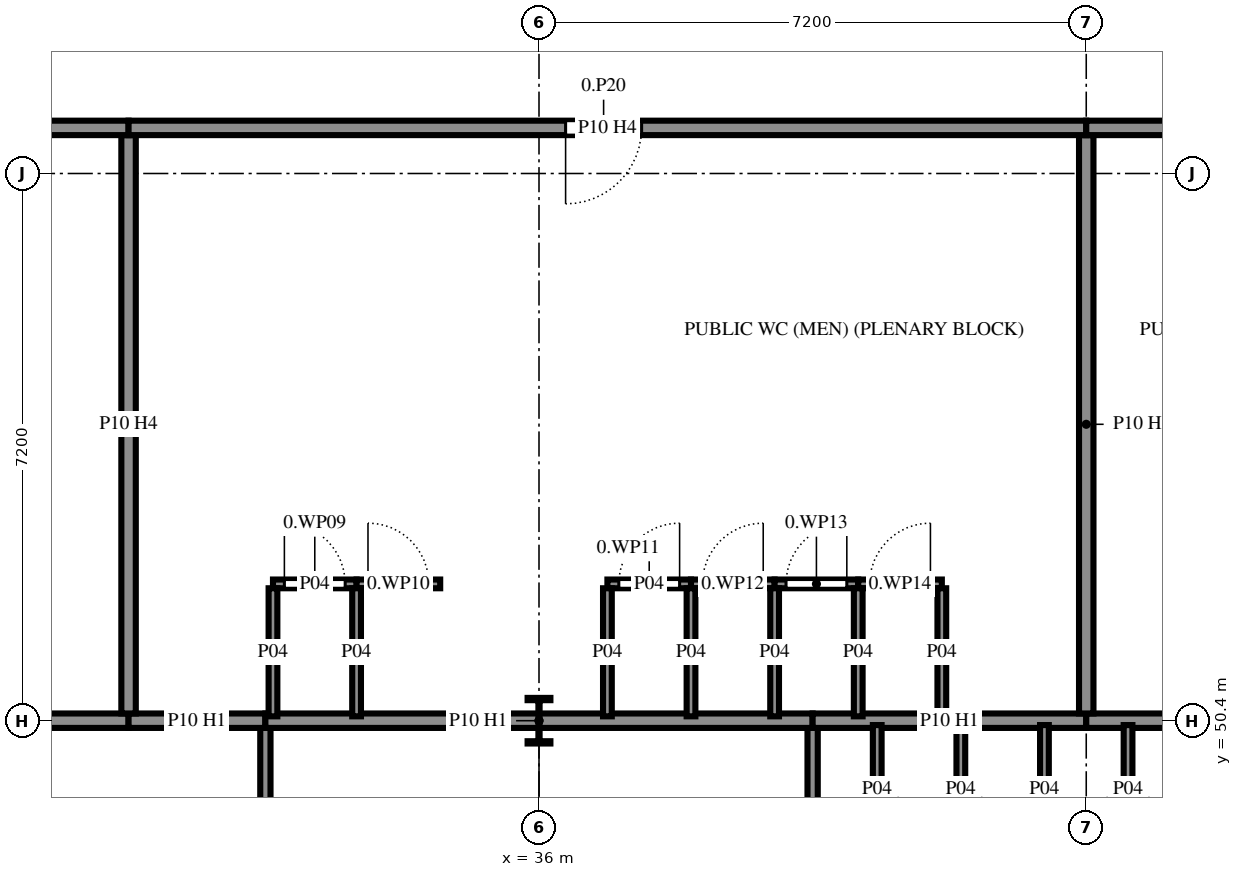
"""IFC4 building model, lengths in metres.
Left out: names, types, materials, properties, quantities, classifications, styles, units other than length and angle.
Written with IfcOpenShell. Run it as: python <this file> out.ifc"""

import sys

from ifc_helpers import new_model, si_unit, direction, frame, frame_2d, origin, origin_2d, place, context, subcontext, project, spatial, rectangle, i_section, extrude, element, fill, save


model = new_model("IFC4")
c1 = context("Model", 3, precision=1e-05, world=origin(), true_north=direction((0.0, 1.0)))
c2 = subcontext(c1, "Body", "Model", "MODEL_VIEW")
j1 = project(units=[si_unit("LENGTHUNIT", "METRE"), si_unit("PLANEANGLEUNIT", "RADIAN")], contexts=[c1])
p1 = place(None, origin())
s1 = spatial("IfcSite", under=j1, at=p1, CompositionType="ELEMENT")
p2 = place(p1, origin())
s2 = spatial("IfcBuilding", under=s1, at=p2, CompositionType="ELEMENT")
p3 = place(p2, origin())
s3 = spatial("IfcBuildingStorey", under=s2, at=p3, CompositionType="ELEMENT", Elevation=0.0)
p4 = place(p3, frame((36.0, 50.4, -0.3), z_axis=(0.0, 0.0, 1.0), x_axis=(1.0, 0.0, 0.0)))
e1 = element("IfcColumn", 1, at=p4, inside=s3, PredefinedType="COLUMN", context=c2, shape_type="SweptSolid", body=[
    extrude(i_section(OverallWidth=0.3, OverallDepth=0.6, WebThickness=0.015, FlangeThickness=0.03, FilletRadius=0.027, at=origin_2d()), origin(), (0.0, 0.0, 1.0), 3.9),
])
p5 = place(p3, frame((32.4, 50.305, 0.0), z_axis=(0.0, 0.0, 1.0), x_axis=(0.0, -1.0, 0.0)))
e2 = element("IfcWall", 2, at=p5, inside=s3, PredefinedType="PARTITIONING", context=c2, shape_type="SweptSolid", body=[
    extrude(rectangle(XDim=7.037, YDim=0.135, at=frame_2d((3.519, 0.0))), origin(), (0.0, 0.0, 1.0), 3.12),
])
p6 = place(p3, frame((25.2, 50.4, 0.0), z_axis=(0.0, 0.0, 1.0), x_axis=(1.0, 0.0, 0.0)))
e3 = element("IfcWall", 3, at=p6, inside=s3, PredefinedType="PARTITIONING", context=c2, shape_type="SweptSolid", body=[
    extrude(rectangle(XDim=5.4, YDim=0.19, at=frame_2d((2.7, 0.0))), origin(), (0.0, 0.0, 1.0), 2.82),
])
p7 = place(p3, frame((30.6, 50.4, 0.0), z_axis=(0.0, 0.0, 1.0), x_axis=(1.0, 0.0, 0.0)))
e4 = element("IfcWall", 4, at=p7, inside=s3, PredefinedType="PARTITIONING", context=c2, shape_type="SweptSolid", body=[
    extrude(rectangle(XDim=1.8, YDim=0.19, at=frame_2d((0.9, 0.0))), origin(), (0.0, 0.0, 1.0), 2.82),
])
p8 = place(p3, frame((39.6, 50.305, 0.0), z_axis=(0.0, 0.0, 1.0), x_axis=(0.0, -1.0, 0.0)))
e5 = element("IfcWall", 5, at=p8, inside=s3, PredefinedType="PARTITIONING", context=c2, shape_type="SweptSolid", body=[
    extrude(rectangle(XDim=7.037, YDim=0.135, at=frame_2d((3.519, 0.0))), origin(), (0.0, 0.0, 1.0), 3.12),
])
p9 = place(p3, frame((32.4, 50.4, 0.0), z_axis=(0.0, 0.0, 1.0), x_axis=(1.0, 0.0, 0.0)))
e6 = element("IfcWall", 6, at=p9, inside=s3, PredefinedType="PARTITIONING", context=c2, shape_type="SweptSolid", body=[
    extrude(rectangle(XDim=7.2, YDim=0.19, at=frame_2d((3.6, 0.0))), origin(), (0.0, 0.0, 1.0), 2.82),
])
p10 = place(p3, frame((39.6, 50.4, 0.0), z_axis=(0.0, 0.0, 1.0), x_axis=(1.0, 0.0, 0.0)))
e7 = element("IfcWall", 7, at=p10, inside=s3, PredefinedType="PARTITIONING", context=c2, shape_type="SweptSolid", body=[
    extrude(rectangle(XDim=3.6, YDim=0.19, at=frame_2d((1.8, 0.0))), origin(), (0.0, 0.0, 1.0), 2.82),
])
p11 = place(p3, frame((43.2, 50.4, 0.0), z_axis=(0.0, 0.0, 1.0), x_axis=(1.0, 0.0, 0.0)))
e8 = element("IfcWall", 8, at=p11, inside=s3, PredefinedType="PARTITIONING", context=c2, shape_type="SweptSolid", body=[
    extrude(rectangle(XDim=3.6, YDim=0.19, at=frame_2d((1.8, 0.0))), origin(), (0.0, 0.0, 1.0), 2.82),
])
p12 = place(p3, frame((30.6, 58.105, 0.0), z_axis=(0.0, 0.0, 1.0), x_axis=(0.0, -1.0, 0.0)))
e9 = element("IfcWall", 9, at=p12, inside=s3, PredefinedType="PARTITIONING", context=c2, shape_type="SweptSolid", body=[
    extrude(rectangle(XDim=7.61, YDim=0.19, at=frame_2d((3.805, 0.0))), origin(), (0.0, 0.0, 1.0), 3.42),
])
p13 = place(p3, frame((21.505, 58.2, 0.0), z_axis=(0.0, 0.0, 1.0), x_axis=(1.0, 0.0, 0.0)))
e10 = element("IfcWall", 10, at=p13, inside=s3, PredefinedType="PARTITIONING", context=c2, shape_type="SweptSolid", body=[
    extrude(rectangle(XDim=9.095, YDim=0.19, at=frame_2d((4.548, 0.0))), origin(), (0.0, 0.0, 1.0), 3.42),
])
p14 = place(p13, frame((4.05, 0.0, 0.0)))
e11 = element("IfcOpeningElement", 11, at=p14, cuts=e10, PredefinedType="OPENING", context=c2, shape_type="SweptSolid", body=[
    extrude(rectangle(XDim=1.0, YDim=2.4, at=frame_2d((0.5, 1.2))), frame((0.0, 0.105, 0.0), z_axis=(0.0, -1.0, 0.0), x_axis=(1.0, 0.0, 0.0)), (0.0, 0.0, 1.0), 0.21),
])
p15 = place(p3, frame((43.2, 58.105, 0.0), z_axis=(0.0, 0.0, 1.0), x_axis=(0.0, -1.0, 0.0)))
e12 = element("IfcWall", 12, at=p15, inside=s3, PredefinedType="PARTITIONING", context=c2, shape_type="SweptSolid", body=[
    extrude(rectangle(XDim=7.61, YDim=0.19, at=frame_2d((3.805, 0.0))), origin(), (0.0, 0.0, 1.0), 3.11),
])
p16 = place(p3, frame((30.6, 58.2, 0.0), z_axis=(0.0, 0.0, 1.0), x_axis=(1.0, 0.0, 0.0)))
e13 = element("IfcWall", 13, at=p16, inside=s3, PredefinedType="PARTITIONING", context=c2, shape_type="SweptSolid", body=[
    extrude(rectangle(XDim=12.6, YDim=0.19, at=frame_2d((6.3, 0.0))), origin(), (0.0, 0.0, 1.0), 3.42),
])
p17 = place(p16, frame((5.75, 0.0, 0.0)))
e14 = element("IfcOpeningElement", 14, at=p17, cuts=e13, PredefinedType="OPENING", context=c2, shape_type="SweptSolid", body=[
    extrude(rectangle(XDim=1.0, YDim=2.4, at=frame_2d((0.5, 1.2))), frame((0.0, 0.105, 0.0), z_axis=(0.0, -1.0, 0.0), x_axis=(1.0, 0.0, 0.0)), (0.0, 0.0, 1.0), 0.21),
])
p18 = place(p3, frame((43.2, 58.2, 0.0), z_axis=(0.0, 0.0, 1.0), x_axis=(1.0, 0.0, 0.0)))
e15 = element("IfcWall", 15, at=p18, inside=s3, PredefinedType="PARTITIONING", context=c2, shape_type="SweptSolid", body=[
    extrude(rectangle(XDim=12.6, YDim=0.19, at=frame_2d((6.3, 0.0))), origin(), (0.0, 0.0, 1.0), 3.42),
])
p19 = place(p18, frame((5.75, 0.0, 0.0)))
e16 = element("IfcOpeningElement", 16, at=p19, cuts=e15, PredefinedType="OPENING", context=c2, shape_type="SweptSolid", body=[
    extrude(rectangle(XDim=1.0, YDim=2.4, at=frame_2d((0.5, 1.2))), frame((0.0, 0.105, 0.0), z_axis=(0.0, -1.0, 0.0), x_axis=(1.0, 0.0, 0.0)), (0.0, 0.0, 1.0), 0.21),
])
for number, where, z_axis, x_axis in (
    (17, (40.45, 50.343, 0.0), (0.0, 0.0, 1.0), (0.0, -1.0, 0.0)),
    (18, (41.55, 50.343, 0.0), (0.0, 0.0, 1.0), (0.0, -1.0, 0.0)),
    (19, (42.65, 50.343, 0.0), (0.0, 0.0, 1.0), (0.0, -1.0, 0.0)),
    (20, (43.75, 50.343, 0.0), (0.0, 0.0, 1.0), (0.0, -1.0, 0.0)),
):
    element("IfcWall", number, at=place(p3, frame(where, z_axis=z_axis, x_axis=x_axis)), inside=s3, PredefinedType="PARTITIONING", context=c2, shape_type="SweptSolid", body=[
        extrude(rectangle(XDim=1.685, YDim=0.115, at=frame_2d((0.843, 0.0))), origin(), (0.0, 0.0, 1.0), 3.42),
    ])
p20 = place(p3, frame((32.5, 52.2, 0.0), z_axis=(0.0, 0.0, 1.0), x_axis=(1.0, 0.0, 0.0)))
e21 = element("IfcWall", 21, at=p20, inside=s3, PredefinedType="PARTITIONING", context=c2, shape_type="SweptSolid", body=[
    extrude(rectangle(XDim=1.1, YDim=0.115, at=frame_2d((0.55, 0.0))), origin(), (0.0, 0.0, 1.0), 3.42),
])
p21 = place(p20, frame((0.15, 0.0, 0.0)))
e22 = element("IfcOpeningElement", 22, at=p21, cuts=e21, PredefinedType="OPENING", context=c2, shape_type="SweptSolid", body=[
    extrude(rectangle(XDim=0.8, YDim=2.1, at=frame_2d((0.4, 1.05))), frame((0.0, 0.067, 0.0), z_axis=(0.0, -1.0, 0.0), x_axis=(1.0, 0.0, 0.0)), (0.0, 0.0, 1.0), 0.135),
])
p22 = place(p3, frame((32.5, 50.458, 0.0), z_axis=(0.0, 0.0, 1.0), x_axis=(0.0, 1.0, 0.0)))
e23 = element("IfcWall", 23, at=p22, inside=s3, PredefinedType="PARTITIONING", context=c2, shape_type="SweptSolid", body=[
    extrude(rectangle(XDim=1.685, YDim=0.115, at=frame_2d((0.843, 0.0))), origin(), (0.0, 0.0, 1.0), 3.42),
])
p23 = place(p3, frame((33.6, 52.2, 0.0), z_axis=(0.0, 0.0, 1.0), x_axis=(1.0, 0.0, 0.0)))
e24 = element("IfcWall", 24, at=p23, inside=s3, PredefinedType="PARTITIONING", context=c2, shape_type="SweptSolid", body=[
    extrude(rectangle(XDim=1.1, YDim=0.115, at=frame_2d((0.55, 0.0))), origin(), (0.0, 0.0, 1.0), 3.42),
])
p24 = place(p23, frame((0.15, 0.0, 0.0)))
e25 = element("IfcOpeningElement", 25, at=p24, cuts=e24, PredefinedType="OPENING", context=c2, shape_type="SweptSolid", body=[
    extrude(rectangle(XDim=0.8, YDim=2.1, at=frame_2d((0.4, 1.05))), frame((0.0, 0.067, 0.0), z_axis=(0.0, -1.0, 0.0), x_axis=(1.0, 0.0, 0.0)), (0.0, 0.0, 1.0), 0.135),
])
p25 = place(p3, frame((33.6, 50.458, 0.0), z_axis=(0.0, 0.0, 1.0), x_axis=(0.0, 1.0, 0.0)))
e26 = element("IfcWall", 26, at=p25, inside=s3, PredefinedType="PARTITIONING", context=c2, shape_type="SweptSolid", body=[
    extrude(rectangle(XDim=1.685, YDim=0.115, at=frame_2d((0.843, 0.0))), origin(), (0.0, 0.0, 1.0), 3.42),
])
p26 = place(p3, frame((36.9, 52.2, 0.0), z_axis=(0.0, 0.0, 1.0), x_axis=(1.0, 0.0, 0.0)))
e27 = element("IfcWall", 27, at=p26, inside=s3, PredefinedType="PARTITIONING", context=c2, shape_type="SweptSolid", body=[
    extrude(rectangle(XDim=1.1, YDim=0.115, at=frame_2d((0.55, 0.0))), origin(), (0.0, 0.0, 1.0), 3.42),
])
p27 = place(p26, frame((0.15, 0.0, 0.0)))
e28 = element("IfcOpeningElement", 28, at=p27, cuts=e27, PredefinedType="OPENING", context=c2, shape_type="SweptSolid", body=[
    extrude(rectangle(XDim=0.8, YDim=2.1, at=frame_2d((0.4, 1.05))), frame((0.0, 0.067, 0.0), z_axis=(0.0, -1.0, 0.0), x_axis=(1.0, 0.0, 0.0)), (0.0, 0.0, 1.0), 0.135),
])
p28 = place(p3, frame((36.9, 50.458, 0.0), z_axis=(0.0, 0.0, 1.0), x_axis=(0.0, 1.0, 0.0)))
e29 = element("IfcWall", 29, at=p28, inside=s3, PredefinedType="PARTITIONING", context=c2, shape_type="SweptSolid", body=[
    extrude(rectangle(XDim=1.685, YDim=0.115, at=frame_2d((0.843, 0.0))), origin(), (0.0, 0.0, 1.0), 3.42),
])
p29 = place(p3, frame((38.0, 52.2, 0.0), z_axis=(0.0, 0.0, 1.0), x_axis=(1.0, 0.0, 0.0)))
e30 = element("IfcWall", 30, at=p29, inside=s3, PredefinedType="PARTITIONING", context=c2, shape_type="SweptSolid", body=[
    extrude(rectangle(XDim=1.1, YDim=0.115, at=frame_2d((0.55, 0.0))), origin(), (0.0, 0.0, 1.0), 3.42),
])
p30 = place(p29, frame((0.15, 0.0, 0.0)))
e31 = element("IfcOpeningElement", 31, at=p30, cuts=e30, PredefinedType="OPENING", context=c2, shape_type="SweptSolid", body=[
    extrude(rectangle(XDim=0.8, YDim=2.1, at=frame_2d((0.4, 1.05))), frame((0.0, 0.067, 0.0), z_axis=(0.0, -1.0, 0.0), x_axis=(1.0, 0.0, 0.0)), (0.0, 0.0, 1.0), 0.135),
])
p31 = place(p3, frame((38.0, 50.458, 0.0), z_axis=(0.0, 0.0, 1.0), x_axis=(0.0, 1.0, 0.0)))
e32 = element("IfcWall", 32, at=p31, inside=s3, PredefinedType="PARTITIONING", context=c2, shape_type="SweptSolid", body=[
    extrude(rectangle(XDim=1.685, YDim=0.115, at=frame_2d((0.843, 0.0))), origin(), (0.0, 0.0, 1.0), 3.42),
])
p32 = place(p3, frame((39.1, 52.2, 0.0), z_axis=(0.0, 0.0, 1.0), x_axis=(1.0, 0.0, 0.0)))
e33 = element("IfcWall", 33, at=p32, inside=s3, PredefinedType="PARTITIONING", context=c2, shape_type="SweptSolid", body=[
    extrude(rectangle(XDim=1.1, YDim=0.115, at=frame_2d((0.55, 0.0))), origin(), (0.0, 0.0, 1.0), 3.42),
])
p33 = place(p32, frame((0.15, 0.0, 0.0)))
e34 = element("IfcOpeningElement", 34, at=p33, cuts=e33, PredefinedType="OPENING", context=c2, shape_type="SweptSolid", body=[
    extrude(rectangle(XDim=0.8, YDim=2.1, at=frame_2d((0.4, 1.05))), frame((0.0, 0.067, 0.0), z_axis=(0.0, -1.0, 0.0), x_axis=(1.0, 0.0, 0.0)), (0.0, 0.0, 1.0), 0.135),
])
p34 = place(p3, frame((39.1, 50.458, 0.0), z_axis=(0.0, 0.0, 1.0), x_axis=(0.0, 1.0, 0.0)))
e35 = element("IfcWall", 35, at=p34, inside=s3, PredefinedType="PARTITIONING", context=c2, shape_type="SweptSolid", body=[
    extrude(rectangle(XDim=1.685, YDim=0.115, at=frame_2d((0.843, 0.0))), origin(), (0.0, 0.0, 1.0), 3.42),
])
p35 = place(p3, frame((40.2, 52.2, 0.0), z_axis=(0.0, 0.0, 1.0), x_axis=(1.0, 0.0, 0.0)))
e36 = element("IfcWall", 36, at=p35, inside=s3, PredefinedType="PARTITIONING", context=c2, shape_type="SweptSolid", body=[
    extrude(rectangle(XDim=1.1, YDim=0.115, at=frame_2d((0.55, 0.0))), origin(), (0.0, 0.0, 1.0), 3.42),
])
p36 = place(p35, frame((0.15, 0.0, 0.0)))
e37 = element("IfcOpeningElement", 37, at=p36, cuts=e36, PredefinedType="OPENING", context=c2, shape_type="SweptSolid", body=[
    extrude(rectangle(XDim=0.8, YDim=2.1, at=frame_2d((0.4, 1.05))), frame((0.0, 0.067, 0.0), z_axis=(0.0, -1.0, 0.0), x_axis=(1.0, 0.0, 0.0)), (0.0, 0.0, 1.0), 0.135),
])
for number, where, z_axis, x_axis in (
    (38, (40.2, 50.458, 0.0), (0.0, 0.0, 1.0), (0.0, 1.0, 0.0)),
    (39, (41.3, 50.458, 0.0), (0.0, 0.0, 1.0), (0.0, 1.0, 0.0)),
):
    element("IfcWall", number, at=place(p3, frame(where, z_axis=z_axis, x_axis=x_axis)), inside=s3, PredefinedType="PARTITIONING", context=c2, shape_type="SweptSolid", body=[
        extrude(rectangle(XDim=1.685, YDim=0.115, at=frame_2d((0.843, 0.0))), origin(), (0.0, 0.0, 1.0), 3.42),
    ])
p37 = place(p17, frame((1.0, 0.0, 0.0), z_axis=(0.0, 0.0, 1.0), x_axis=(-1.0, 0.0, 0.0)))
e40 = element("IfcDoor", 40, at=p37, inside=s3, OperationType="SINGLE_SWING_LEFT", PredefinedType="DOOR", context=c2, shape_type="SweptSolid", body=[
    extrude(rectangle(XDim=1.0, YDim=2.4, at=frame_2d((0.5, 1.2))), frame((0.0, 0.025, 0.0), z_axis=(0.0, -1.0, 0.0), x_axis=(1.0, 0.0, 0.0)), (0.0, 0.0, 1.0), 0.05),
])
fill(e14, e40)
p38 = place(p21, origin())
e41 = element("IfcDoor", 41, at=p38, inside=s3, OperationType="SINGLE_SWING_RIGHT", PredefinedType="DOOR", context=c2, shape_type="SweptSolid", body=[
    extrude(rectangle(XDim=0.8, YDim=2.1, at=frame_2d((0.4, 1.05))), frame((0.0, 0.025, 0.0), z_axis=(0.0, -1.0, 0.0), x_axis=(1.0, 0.0, 0.0)), (0.0, 0.0, 1.0), 0.05),
])
fill(e22, e41)
p39 = place(p24, origin())
e42 = element("IfcDoor", 42, at=p39, inside=s3, OperationType="SINGLE_SWING_RIGHT", PredefinedType="DOOR", context=c2, shape_type="SweptSolid", body=[
    extrude(rectangle(XDim=0.8, YDim=2.1, at=frame_2d((0.4, 1.05))), frame((0.0, 0.025, 0.0), z_axis=(0.0, -1.0, 0.0), x_axis=(1.0, 0.0, 0.0)), (0.0, 0.0, 1.0), 0.05),
])
fill(e25, e42)
p40 = place(p27, origin())
e43 = element("IfcDoor", 43, at=p40, inside=s3, OperationType="SINGLE_SWING_LEFT", PredefinedType="DOOR", context=c2, shape_type="SweptSolid", body=[
    extrude(rectangle(XDim=0.8, YDim=2.1, at=frame_2d((0.4, 1.05))), frame((0.0, 0.025, 0.0), z_axis=(0.0, -1.0, 0.0), x_axis=(1.0, 0.0, 0.0)), (0.0, 0.0, 1.0), 0.05),
])
fill(e28, e43)
p41 = place(p30, origin())
e44 = element("IfcDoor", 44, at=p41, inside=s3, OperationType="SINGLE_SWING_LEFT", PredefinedType="DOOR", context=c2, shape_type="SweptSolid", body=[
    extrude(rectangle(XDim=0.8, YDim=2.1, at=frame_2d((0.4, 1.05))), frame((0.0, 0.025, 0.0), z_axis=(0.0, -1.0, 0.0), x_axis=(1.0, 0.0, 0.0)), (0.0, 0.0, 1.0), 0.05),
])
fill(e31, e44)
p42 = place(p33, origin())
e45 = element("IfcDoor", 45, at=p42, inside=s3, OperationType="SINGLE_SWING_LEFT", PredefinedType="DOOR", context=c2, shape_type="SweptSolid", body=[
    extrude(rectangle(XDim=0.8, YDim=2.1, at=frame_2d((0.4, 1.05))), frame((0.0, 0.025, 0.0), z_axis=(0.0, -1.0, 0.0), x_axis=(1.0, 0.0, 0.0)), (0.0, 0.0, 1.0), 0.05),
])
fill(e34, e45)
p43 = place(p36, origin())
e46 = element("IfcDoor", 46, at=p43, inside=s3, OperationType="SINGLE_SWING_LEFT", PredefinedType="DOOR", context=c2, shape_type="SweptSolid", body=[
    extrude(rectangle(XDim=0.8, YDim=2.1, at=frame_2d((0.4, 1.05))), frame((0.0, 0.025, 0.0), z_axis=(0.0, -1.0, 0.0), x_axis=(1.0, 0.0, 0.0)), (0.0, 0.0, 1.0), 0.05),
])
fill(e37, e46)
save(model, sys.argv[1])
